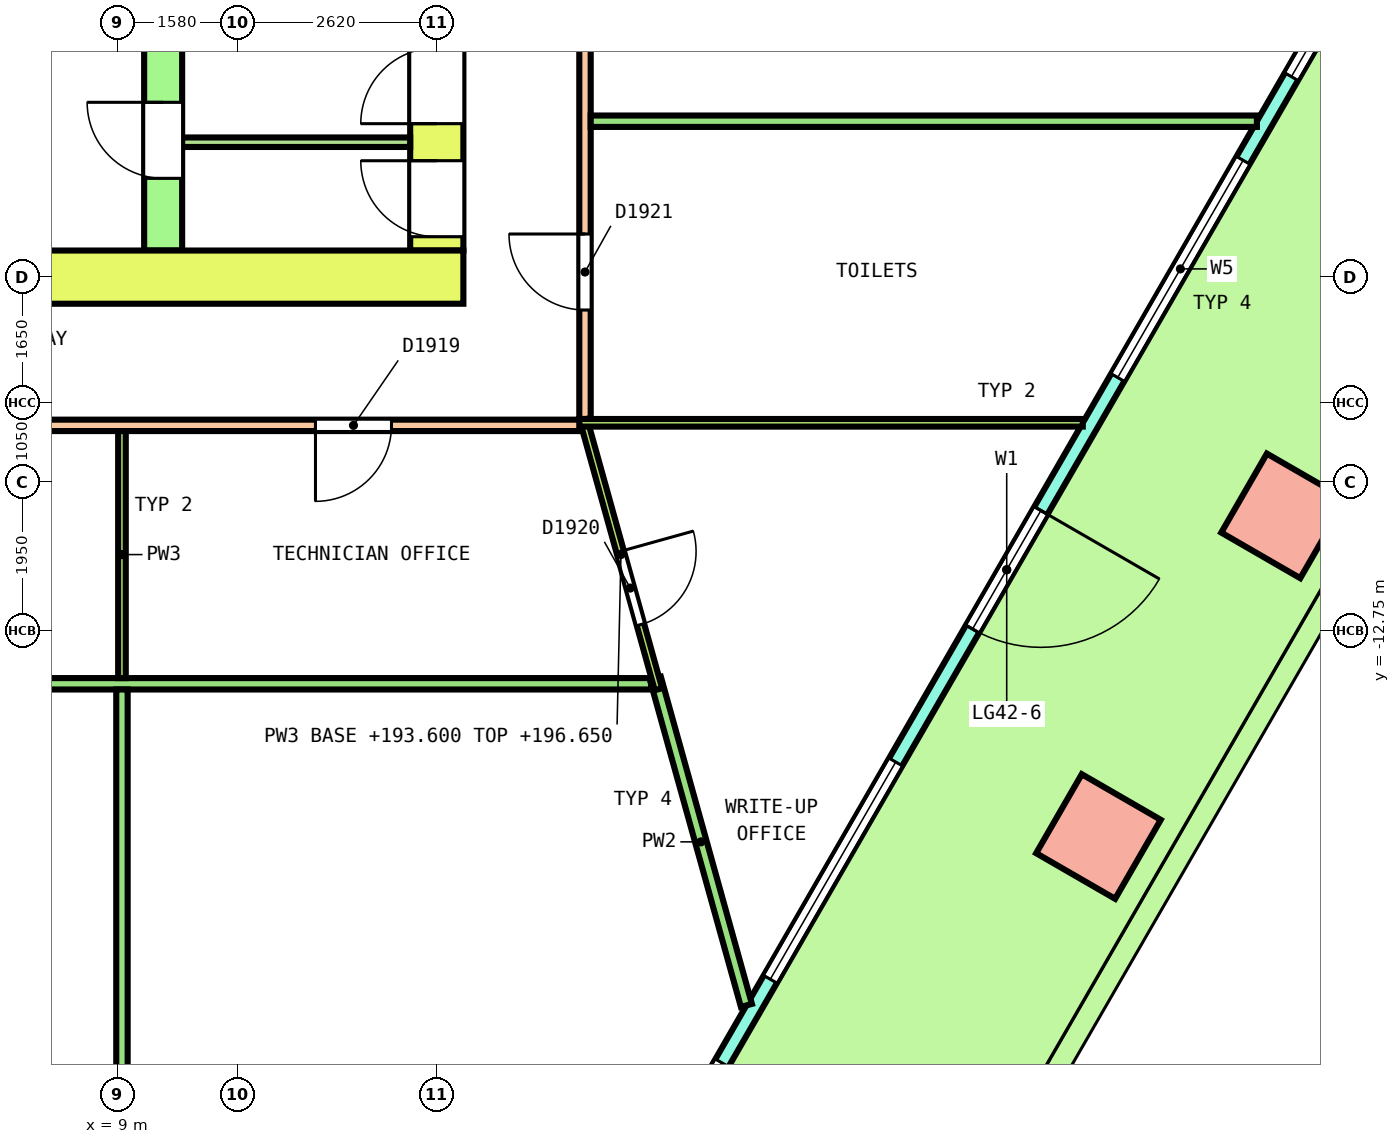
"""IFC4 building model, lengths in metres.
Left out: names, types, materials, properties, quantities, classifications, styles, units other than length and angle.
Written with IfcOpenShell. Run it as: python <this file> out.ifc"""

import sys

from ifc_helpers import new_model, si_unit, direction, frame, frame_2d, origin, origin_2d, place, context, subcontext, project, spatial, polyline, rectangle, outline, extrude, element, fill, save


model = new_model("IFC4")
c1 = context("Model", 3, precision=1e-05, world=origin(), true_north=direction((0.0, 1.0)))
c2 = subcontext(c1, "Body", "Model", "MODEL_VIEW")
j1 = project(units=[si_unit("LENGTHUNIT", "METRE"), si_unit("PLANEANGLEUNIT", "RADIAN")], contexts=[c1])
p1 = place(None, origin())
s1 = spatial("IfcSite", under=j1, at=p1, CompositionType="ELEMENT")
p2 = place(p1, origin())
s2 = spatial("IfcBuilding", under=s1, at=p2, CompositionType="ELEMENT")
p3 = place(p2, frame((0.0, 0.0, 193.6)))
s3 = spatial("IfcBuildingStorey", under=s2, at=p3, CompositionType="ELEMENT", Elevation=193.6)
for number, where, z_axis, x_axis in (
    (1, (21.905, -15.459, 0.0), (0.0, 0.0, 1.0), (0.5, 0.866, 0.0)),
    (2, (24.341, -11.241, 0.0), (0.0, 0.0, 1.0), (0.5, 0.866, 0.0)),
):
    element("IfcColumn", number, at=place(p3, frame(where, z_axis=z_axis, x_axis=x_axis)), inside=s3, PredefinedType="COLUMN", context=c2, shape_type="SweptSolid", body=[
        extrude(rectangle(XDim=1.2, YDim=1.2, at=origin_2d()), origin(), (0.0, 0.0, 1.0), 4.05),
    ])
p4 = place(p3, frame((14.985, -21.845, 0.0), z_axis=(0.0, 0.0, 1.0), x_axis=(0.50000204422, 0.86602422355, 0.0)))
e3 = element("IfcWall", 3, at=p4, inside=s3, PredefinedType="SOLIDWALL", context=c2, shape_type="SweptSolid", body=[
    extrude(outline(polyline([(-0.027, -0.1), (1.014, -0.1), (2.055, -0.1), (3.097, -0.1), (4.138, -0.1), (5.179, -0.1), (6.22, -0.1), (7.261, -0.1), (8.303, -0.1), (9.344, -0.1), (10.385, -0.1), (11.426, -0.1), (12.468, -0.1), (13.509, -0.1), (14.55, -0.1), (15.591, -0.1), (16.632, -0.1), (17.673, -0.1), (18.715, -0.1), (19.756, -0.1), (20.797, -0.1), (21.838, -0.1), (22.879, -0.1), (22.826, 0.1), (21.789, 0.1), (20.753, 0.1), (19.717, 0.1), (18.68, 0.1), (17.644, 0.1), (16.608, 0.1), (15.572, 0.1), (14.535, 0.1), (13.499, 0.1), (12.463, 0.1), (11.426, 0.1), (10.39, 0.1), (9.354, 0.1), (8.317, 0.1), (7.281, 0.1), (6.245, 0.1), (5.208, 0.1), (4.172, 0.1), (3.136, 0.1), (2.099, 0.1), (1.063, 0.1), (0.027, 0.1), (-0.027, -0.1)])), origin(), (0.0, 0.0, 1.0), 4.1),
])
p5 = place(p4, frame((0.635, 0.0, 0.1)))
e4 = element("IfcOpeningElement", 4, at=p5, cuts=e3, PredefinedType="OPENING", context=c2, shape_type="SweptSolid", body=[
    extrude(rectangle(XDim=3.3, YDim=2.9, at=frame_2d((1.65, 1.45))), frame((0.0, 0.11, 0.0), z_axis=(0.0, -1.0, 0.0), x_axis=(1.0, 0.0, 0.0)), (0.0, 0.0, 1.0), 0.22),
])
p6 = place(p4, frame((5.206, 0.0, 0.1)))
e5 = element("IfcOpeningElement", 5, at=p6, cuts=e3, PredefinedType="OPENING", context=c2, shape_type="SweptSolid", body=[
    extrude(rectangle(XDim=3.3, YDim=2.9, at=frame_2d((1.65, 1.45))), frame((0.0, 0.11, 0.0), z_axis=(0.0, -1.0, 0.0), x_axis=(1.0, 0.0, 0.0)), (0.0, 0.0, 1.0), 0.22),
])
p7 = place(p4, frame((10.526, 0.0, 0.0)))
e6 = element("IfcOpeningElement", 6, at=p7, cuts=e3, PredefinedType="OPENING", context=c2, shape_type="SweptSolid", body=[
    extrude(rectangle(XDim=1.8, YDim=2.4, at=frame_2d((0.9, 1.2))), frame((0.0, 0.11, 0.0), z_axis=(0.0, -1.0, 0.0), x_axis=(1.0, 0.0, 0.0)), (0.0, 0.0, 1.0), 0.22),
])
p8 = place(p4, frame((10.526, 0.0, 2.55)))
e7 = element("IfcOpeningElement", 7, at=p8, cuts=e3, PredefinedType="OPENING", context=c2, shape_type="SweptSolid", body=[
    extrude(rectangle(XDim=1.8, YDim=0.45, at=frame_2d((0.9, 0.225))), frame((0.0, 0.11, 0.0), z_axis=(0.0, -1.0, 0.0), x_axis=(1.0, 0.0, 0.0)), (0.0, 0.0, 1.0), 0.22),
])
p9 = place(p4, frame((14.347, 0.0, 0.1)))
e8 = element("IfcOpeningElement", 8, at=p9, cuts=e3, PredefinedType="OPENING", context=c2, shape_type="SweptSolid", body=[
    extrude(rectangle(XDim=3.3, YDim=2.9, at=frame_2d((1.65, 1.45))), frame((0.0, 0.11, 0.0), z_axis=(0.0, -1.0, 0.0), x_axis=(1.0, 0.0, 0.0)), (0.0, 0.0, 1.0), 0.22),
])
p10 = place(p4, frame((18.917, 0.0, 0.1)))
e9 = element("IfcOpeningElement", 9, at=p10, cuts=e3, PredefinedType="OPENING", context=c2, shape_type="SweptSolid", body=[
    extrude(rectangle(XDim=3.3, YDim=2.9, at=frame_2d((1.65, 1.45))), frame((0.0, 0.11, 0.0), z_axis=(0.0, -1.0, 0.0), x_axis=(1.0, 0.0, 0.0)), (0.0, 0.0, 1.0), 0.22),
])
p11 = place(p3, frame((-13.55, -8.1, 0.0), z_axis=(0.0, 0.0, 1.0), x_axis=(1.0, 0.0, 0.0)))
e10 = element("IfcWall", 10, at=p11, inside=s3, PredefinedType="SHEAR", context=c2, shape_type="SweptSolid", body=[
    extrude(rectangle(XDim=27.1, YDim=0.7, at=frame_2d((13.55, 0.0))), origin(), (0.0, 0.0, 1.0), 4.1),
])
p12 = place(p11, frame((15.1, 0.0, 0.0)))
e11 = element("IfcOpeningElement", 11, at=p12, cuts=e10, PredefinedType="OPENING", context=c2, shape_type="SweptSolid", body=[
    extrude(rectangle(XDim=1.2, YDim=2.1, at=frame_2d((0.6, 1.05))), frame((0.0, 0.36, 0.0), z_axis=(0.0, -1.0, 0.0), x_axis=(1.0, 0.0, 0.0)), (0.0, 0.0, 1.0), 0.72),
])
p13 = place(p3, frame((13.2, -7.75, 0.0), z_axis=(0.0, 0.0, 1.0), x_axis=(0.0, 1.0, 0.0)))
e12 = element("IfcWall", 12, at=p13, inside=s3, PredefinedType="SHEAR", context=c2, shape_type="SweptSolid", body=[
    extrude(rectangle(XDim=15.5, YDim=0.7, at=frame_2d((7.75, 0.0))), origin(), (0.0, 0.0, 1.0), 4.1),
])
p14 = place(p13, frame((6.55, 0.0, 0.0)))
e13 = element("IfcOpeningElement", 13, at=p14, cuts=e12, PredefinedType="OPENING", context=c2, shape_type="SweptSolid", body=[
    extrude(rectangle(XDim=2.4, YDim=2.1, at=frame_2d((1.2, 1.05))), frame((0.0, 0.36, 0.0), z_axis=(0.0, -1.0, 0.0), x_axis=(1.0, 0.0, 0.0)), (0.0, 0.0, 1.0), 0.72),
])
p15 = place(p13, frame((13.45, 0.0, 0.0)))
e14 = element("IfcOpeningElement", 14, at=p15, cuts=e12, PredefinedType="OPENING", context=c2, shape_type="SweptSolid", body=[
    extrude(rectangle(XDim=1.2, YDim=2.1, at=frame_2d((0.6, 1.05))), frame((0.0, 0.36, 0.0), z_axis=(0.0, -1.0, 0.0), x_axis=(1.0, 0.0, 0.0)), (0.0, 0.0, 1.0), 0.72),
])
p16 = place(p13, frame((0.181, 0.0, 0.0)))
e15 = element("IfcOpeningElement", 15, at=p16, cuts=e12, PredefinedType="OPENING", context=c2, shape_type="SweptSolid", body=[
    extrude(rectangle(XDim=1.0, YDim=2.1, at=frame_2d((0.5, 1.05))), frame((0.0, 0.36, 0.0), z_axis=(0.0, -1.0, 0.0), x_axis=(1.0, 0.0, 0.0)), (0.0, 0.0, 1.0), 0.72),
])
p17 = place(p13, frame((1.669, 0.0, 0.0)))
e16 = element("IfcOpeningElement", 16, at=p17, cuts=e12, PredefinedType="OPENING", context=c2, shape_type="SweptSolid", body=[
    extrude(rectangle(XDim=1.0, YDim=2.1, at=frame_2d((0.5, 1.05))), frame((0.0, 0.36, 0.0), z_axis=(0.0, -1.0, 0.0), x_axis=(1.0, 0.0, 0.0)), (0.0, 0.0, 1.0), 0.72),
])
p18 = place(p3, frame((9.6, -7.75, 0.0), z_axis=(0.0, 0.0, 1.0), x_axis=(0.0, 1.0, 0.0)))
e17 = element("IfcWall", 17, at=p18, inside=s3, PredefinedType="SHEAR", context=c2, shape_type="SweptSolid", body=[
    extrude(rectangle(XDim=15.5, YDim=0.5, at=frame_2d((7.75, 0.0))), origin(), (0.0, 0.0, 1.0), 4.1),
])
p19 = place(p18, frame((6.55, 0.0, 0.0)))
e18 = element("IfcOpeningElement", 18, at=p19, cuts=e17, PredefinedType="OPENING", context=c2, shape_type="SweptSolid", body=[
    extrude(rectangle(XDim=2.4, YDim=2.1, at=frame_2d((1.2, 1.05))), frame((0.0, 0.26, 0.0), z_axis=(0.0, -1.0, 0.0), x_axis=(1.0, 0.0, 0.0)), (0.0, 0.0, 1.0), 0.52),
])
p20 = place(p18, frame((13.45, 0.0, 0.0)))
e19 = element("IfcOpeningElement", 19, at=p20, cuts=e17, PredefinedType="OPENING", context=c2, shape_type="SweptSolid", body=[
    extrude(rectangle(XDim=1.2, YDim=2.1, at=frame_2d((0.6, 1.05))), frame((0.0, 0.26, 0.0), z_axis=(0.0, -1.0, 0.0), x_axis=(1.0, 0.0, 0.0)), (0.0, 0.0, 1.0), 0.52),
])
p21 = place(p18, frame((0.95, 0.0, 0.0)))
e20 = element("IfcOpeningElement", 20, at=p21, cuts=e17, PredefinedType="OPENING", context=c2, shape_type="SweptSolid", body=[
    extrude(rectangle(XDim=1.0, YDim=2.1, at=frame_2d((0.5, 1.05))), frame((0.0, 0.26, 0.0), z_axis=(0.0, -1.0, 0.0), x_axis=(1.0, 0.0, 0.0)), (0.0, 0.0, 1.0), 0.52),
])
p22 = place(p3, frame((9.85, -6.325, 0.0), z_axis=(0.0, 0.0, 1.0), x_axis=(1.0, 0.0, 0.0)))
e21 = element("IfcWall", 21, at=p22, inside=s3, PredefinedType="PARTITIONING", context=c2, shape_type="SweptSolid", body=[
    extrude(rectangle(XDim=3.0, YDim=0.125, at=frame_2d((1.5, 0.0))), origin(), (0.0, 0.0, 1.0), 4.1),
])
p23 = place(p3, frame((15.15, -9.966, 0.0), z_axis=(0.0, 0.0, 1.0), x_axis=(0.0, 1.0, 0.0)))
e22 = element("IfcWall", 22, at=p23, inside=s3, PredefinedType="PARTITIONING", context=c2, shape_type="SweptSolid", body=[
    extrude(rectangle(XDim=8.692, YDim=0.15, at=frame_2d((4.346, 0.0))), origin(), (0.0, 0.0, 1.0), 3.05),
])
p24 = place(p23, frame((1.434, 0.0, 0.0)))
e23 = element("IfcOpeningElement", 23, at=p24, cuts=e22, PredefinedType="OPENING", context=c2, shape_type="SweptSolid", body=[
    extrude(rectangle(XDim=1.0, YDim=2.1, at=frame_2d((0.5, 1.05))), frame((0.0, 0.085, 0.0), z_axis=(0.0, -1.0, 0.0), x_axis=(1.0, 0.0, 0.0)), (0.0, 0.0, 1.0), 0.17),
])
p25 = place(p3, frame((-15.225, -10.05, 0.0), z_axis=(0.0, 0.0, 1.0), x_axis=(1.0, 0.0, 0.0)))
e24 = element("IfcWall", 24, at=p25, inside=s3, PredefinedType="PARTITIONING", context=c2, shape_type="SweptSolid", body=[
    extrude(rectangle(XDim=30.325, YDim=0.15, at=frame_2d((15.163, 0.0))), origin(), (0.0, 0.0, 1.0), 3.05),
])
p26 = place(p25, frame((3.742, 0.0, 0.0)))
e25 = element("IfcOpeningElement", 25, at=p26, cuts=e24, PredefinedType="OPENING", context=c2, shape_type="SweptSolid", body=[
    extrude(rectangle(XDim=1.0, YDim=2.1, at=frame_2d((0.5, 1.05))), frame((0.0, 0.085, 0.0), z_axis=(0.0, -1.0, 0.0), x_axis=(1.0, 0.0, 0.0)), (0.0, 0.0, 1.0), 0.17),
])
p27 = place(p25, frame((12.193, 0.0, 0.0)))
e26 = element("IfcOpeningElement", 26, at=p27, cuts=e24, PredefinedType="OPENING", context=c2, shape_type="SweptSolid", body=[
    extrude(rectangle(XDim=1.2, YDim=2.1, at=frame_2d((0.6, 1.05))), frame((0.0, 0.085, 0.0), z_axis=(0.0, -1.0, 0.0), x_axis=(1.0, 0.0, 0.0)), (0.0, 0.0, 1.0), 0.17),
])
p28 = place(p25, frame((26.829, 0.0, 0.0)))
e27 = element("IfcOpeningElement", 27, at=p28, cuts=e24, PredefinedType="OPENING", context=c2, shape_type="SweptSolid", body=[
    extrude(rectangle(XDim=1.0, YDim=2.1, at=frame_2d((0.5, 1.05))), frame((0.0, 0.085, 0.0), z_axis=(0.0, -1.0, 0.0), x_axis=(1.0, 0.0, 0.0)), (0.0, 0.0, 1.0), 0.17),
])
p29 = place(p3, frame((-14.983, -13.45, 0.0), z_axis=(0.0, 0.0, 1.0), x_axis=(1.0, 0.0, 0.0)))
e28 = element("IfcWall", 28, at=p29, inside=s3, PredefinedType="PARTITIONING", context=c2, shape_type="SweptSolid", body=[
    extrude(rectangle(XDim=31.004, YDim=0.15, at=frame_2d((15.502, 0.0))), origin(), (0.0, 0.0, 1.0), 3.05),
])
p30 = place(p29, frame((1.3, 0.0, 0.0)))
e29 = element("IfcOpeningElement", 29, at=p30, cuts=e28, PredefinedType="OPENING", context=c2, shape_type="SweptSolid", body=[
    extrude(rectangle(XDim=1.2, YDim=2.1, at=frame_2d((0.6, 1.05))), frame((0.0, 0.085, 0.0), z_axis=(0.0, -1.0, 0.0), x_axis=(1.0, 0.0, 0.0)), (0.0, 0.0, 1.0), 0.17),
])
p31 = place(p3, frame((9.058, -25.152, 0.0), z_axis=(0.0, 0.0, 1.0), x_axis=(0.0, 1.0, 0.0)))
e30 = element("IfcWall", 30, at=p31, inside=s3, PredefinedType="PARTITIONING", context=c2, shape_type="SweptSolid", body=[
    extrude(rectangle(XDim=11.627, YDim=0.15, at=frame_2d((5.813, 0.0))), origin(), (0.0, 0.0, 1.0), 3.05),
])
p32 = place(p31, frame((3.781, 0.0, 0.0)))
e31 = element("IfcOpeningElement", 31, at=p32, cuts=e30, PredefinedType="OPENING", context=c2, shape_type="SweptSolid", body=[
    extrude(rectangle(XDim=1.2, YDim=2.1, at=frame_2d((0.6, 1.05))), frame((0.0, 0.085, 0.0), z_axis=(0.0, -1.0, 0.0), x_axis=(1.0, 0.0, 0.0)), (0.0, 0.0, 1.0), 0.17),
])
p33 = place(p3, frame((16.076, -13.378, 0.0), z_axis=(0.0, 0.0, 1.0), x_axis=(0.268117368294, -0.963386255257, 0.0)))
e32 = element("IfcWall", 32, at=p33, inside=s3, PredefinedType="PARTITIONING", context=c2, shape_type="SweptSolid", body=[
    extrude(rectangle(XDim=4.467, YDim=0.15, at=frame_2d((2.234, 0.0))), origin(), (0.0, 0.0, 1.0), 3.05),
])
p34 = place(p3, frame((15.225, -6.049, 0.0), z_axis=(0.0, 0.0, 1.0), x_axis=(1.0, 0.0, 0.0)))
e33 = element("IfcWall", 33, at=p34, inside=s3, PredefinedType="PARTITIONING", context=c2, shape_type="SweptSolid", body=[
    extrude(rectangle(XDim=8.764, YDim=0.15, at=frame_2d((4.382, 0.0))), origin(), (0.0, 0.0, 1.0), 3.05),
])
p35 = place(p3, frame((9.058, -13.375, 0.0), z_axis=(0.0, 0.0, 1.0), x_axis=(0.0, 1.0, 0.0)))
e34 = element("IfcWall", 34, at=p35, inside=s3, PredefinedType="PARTITIONING", context=c2, shape_type="SweptSolid", body=[
    extrude(rectangle(XDim=3.25, YDim=0.1, at=frame_2d((1.625, 0.0))), origin(), (0.0, 0.0, 1.0), 3.05),
])
p36 = place(p3, frame((15.13, -9.978, 0.0), z_axis=(0.0, 0.0, 1.0), x_axis=(0.268088761136, -0.963394216379, 0.0)))
e35 = element("IfcWall", 35, at=p36, inside=s3, PredefinedType="PARTITIONING", context=c2, shape_type="SweptSolid", body=[
    extrude(rectangle(XDim=3.679, YDim=0.1, at=frame_2d((1.84, 0.0))), origin(), (0.0, 0.0, 1.0), 3.05),
])
p37 = place(p36, frame((1.797, 0.0, 0.0)))
e36 = element("IfcOpeningElement", 36, at=p37, cuts=e35, PredefinedType="OPENING", context=c2, shape_type="SweptSolid", body=[
    extrude(rectangle(XDim=1.0, YDim=2.1, at=frame_2d((0.5, 1.05))), frame((0.0, 0.06, 0.0), z_axis=(0.0, -1.0, 0.0), x_axis=(1.0, 0.0, 0.0)), (0.0, 0.0, 1.0), 0.12),
])
p38 = place(p3, frame((15.075, -10.016, 0.0), z_axis=(0.0, 0.0, 1.0), x_axis=(1.0, 0.0, 0.0)))
e37 = element("IfcWall", 37, at=p38, inside=s3, PredefinedType="PARTITIONING", context=c2, shape_type="SweptSolid", body=[
    extrude(rectangle(XDim=6.624, YDim=0.1, at=frame_2d((3.312, 0.0))), origin(), (0.0, 0.0, 1.0), 3.05),
])
p39 = place(p5, origin())
e38 = element("IfcWindow", 38, at=p39, inside=s3, PartitioningType="SINGLE_PANEL", PredefinedType="WINDOW", context=c2, shape_type="SweptSolid", body=[
    extrude(rectangle(XDim=3.3, YDim=2.9, at=frame_2d((1.65, 1.45))), frame((0.0, 0.03, 0.0), z_axis=(0.0, -1.0, 0.0), x_axis=(1.0, 0.0, 0.0)), (0.0, 0.0, 1.0), 0.06),
])
fill(e4, e38)
p40 = place(p6, origin())
e39 = element("IfcWindow", 39, at=p40, inside=s3, PartitioningType="SINGLE_PANEL", PredefinedType="WINDOW", context=c2, shape_type="SweptSolid", body=[
    extrude(rectangle(XDim=3.3, YDim=2.9, at=frame_2d((1.65, 1.45))), frame((0.0, 0.03, 0.0), z_axis=(0.0, -1.0, 0.0), x_axis=(1.0, 0.0, 0.0)), (0.0, 0.0, 1.0), 0.06),
])
fill(e5, e39)
p41 = place(p7, origin())
e40 = element("IfcDoor", 40, at=p41, inside=s3, OperationType="DOUBLE_DOOR_SINGLE_SWING", PredefinedType="DOOR", context=c2, shape_type="SweptSolid", body=[
    extrude(rectangle(XDim=1.8, YDim=2.4, at=frame_2d((0.9, 1.2))), frame((0.0, 0.025, 0.0), z_axis=(0.0, -1.0, 0.0), x_axis=(1.0, 0.0, 0.0)), (0.0, 0.0, 1.0), 0.05),
])
fill(e6, e40)
p42 = place(p8, origin())
e41 = element("IfcWindow", 41, at=p42, inside=s3, PartitioningType="SINGLE_PANEL", PredefinedType="WINDOW", context=c2, shape_type="SweptSolid", body=[
    extrude(rectangle(XDim=1.8, YDim=0.45, at=frame_2d((0.9, 0.225))), frame((0.0, 0.03, 0.0), z_axis=(0.0, -1.0, 0.0), x_axis=(1.0, 0.0, 0.0)), (0.0, 0.0, 1.0), 0.06),
])
fill(e7, e41)
p43 = place(p9, origin())
e42 = element("IfcWindow", 42, at=p43, inside=s3, PartitioningType="SINGLE_PANEL", PredefinedType="WINDOW", context=c2, shape_type="SweptSolid", body=[
    extrude(rectangle(XDim=3.3, YDim=2.9, at=frame_2d((1.65, 1.45))), frame((0.0, 0.03, 0.0), z_axis=(0.0, -1.0, 0.0), x_axis=(1.0, 0.0, 0.0)), (0.0, 0.0, 1.0), 0.06),
])
fill(e8, e42)
p44 = place(p10, origin())
e43 = element("IfcWindow", 43, at=p44, inside=s3, PartitioningType="SINGLE_PANEL", PredefinedType="WINDOW", context=c2, shape_type="SweptSolid", body=[
    extrude(rectangle(XDim=3.3, YDim=2.9, at=frame_2d((1.65, 1.45))), frame((0.0, 0.03, 0.0), z_axis=(0.0, -1.0, 0.0), x_axis=(1.0, 0.0, 0.0)), (0.0, 0.0, 1.0), 0.06),
])
fill(e9, e43)
p45 = place(p21, origin())
e44 = element("IfcDoor", 44, at=p45, inside=s3, OperationType="SINGLE_SWING_LEFT", PredefinedType="DOOR", context=c2, shape_type="SweptSolid", body=[
    extrude(rectangle(XDim=1.0, YDim=2.1, at=frame_2d((0.5, 1.05))), frame((0.0, 0.2, 0.0), z_axis=(0.0, -1.0, 0.0), x_axis=(1.0, 0.0, 0.0)), (0.0, 0.0, 1.0), 0.4),
])
fill(e20, e44)
p46 = place(p16, origin())
e45 = element("IfcDoor", 45, at=p46, inside=s3, OperationType="SINGLE_SWING_RIGHT", PredefinedType="DOOR", context=c2, shape_type="SweptSolid", body=[
    extrude(rectangle(XDim=1.0, YDim=2.1, at=frame_2d((0.5, 1.05))), frame((0.0, 0.3, 0.0), z_axis=(0.0, -1.0, 0.0), x_axis=(1.0, 0.0, 0.0)), (0.0, 0.0, 1.0), 0.6),
])
fill(e15, e45)
p47 = place(p17, origin())
e46 = element("IfcDoor", 46, at=p47, inside=s3, OperationType="SINGLE_SWING_LEFT", PredefinedType="DOOR", context=c2, shape_type="SweptSolid", body=[
    extrude(rectangle(XDim=1.0, YDim=2.1, at=frame_2d((0.5, 1.05))), frame((0.0, 0.3, 0.0), z_axis=(0.0, -1.0, 0.0), x_axis=(1.0, 0.0, 0.0)), (0.0, 0.0, 1.0), 0.6),
])
fill(e16, e46)
p48 = place(p28, origin())
e47 = element("IfcDoor", 47, at=p48, inside=s3, OperationType="SINGLE_SWING_LEFT", PredefinedType="DOOR", context=c2, shape_type="SweptSolid", body=[
    extrude(rectangle(XDim=1.0, YDim=2.1, at=frame_2d((0.5, 1.05))), frame((0.0, 0.025, 0.0), z_axis=(0.0, -1.0, 0.0), x_axis=(1.0, 0.0, 0.0)), (0.0, 0.0, 1.0), 0.05),
])
fill(e27, e47)
p49 = place(p37, origin())
e48 = element("IfcDoor", 48, at=p49, inside=s3, OperationType="SINGLE_SWING_RIGHT", PredefinedType="DOOR", context=c2, shape_type="SweptSolid", body=[
    extrude(rectangle(XDim=1.0, YDim=2.1, at=frame_2d((0.5, 1.05))), frame((0.0, 0.025, 0.0), z_axis=(0.0, -1.0, 0.0), x_axis=(1.0, 0.0, 0.0)), (0.0, 0.0, 1.0), 0.05),
])
fill(e36, e48)
p50 = place(p24, origin())
e49 = element("IfcDoor", 49, at=p50, inside=s3, OperationType="SINGLE_SWING_RIGHT", PredefinedType="DOOR", context=c2, shape_type="SweptSolid", body=[
    extrude(rectangle(XDim=1.0, YDim=2.1, at=frame_2d((0.5, 1.05))), frame((0.0, 0.025, 0.0), z_axis=(0.0, -1.0, 0.0), x_axis=(1.0, 0.0, 0.0)), (0.0, 0.0, 1.0), 0.05),
])
fill(e23, e49)
save(model, sys.argv[1])
